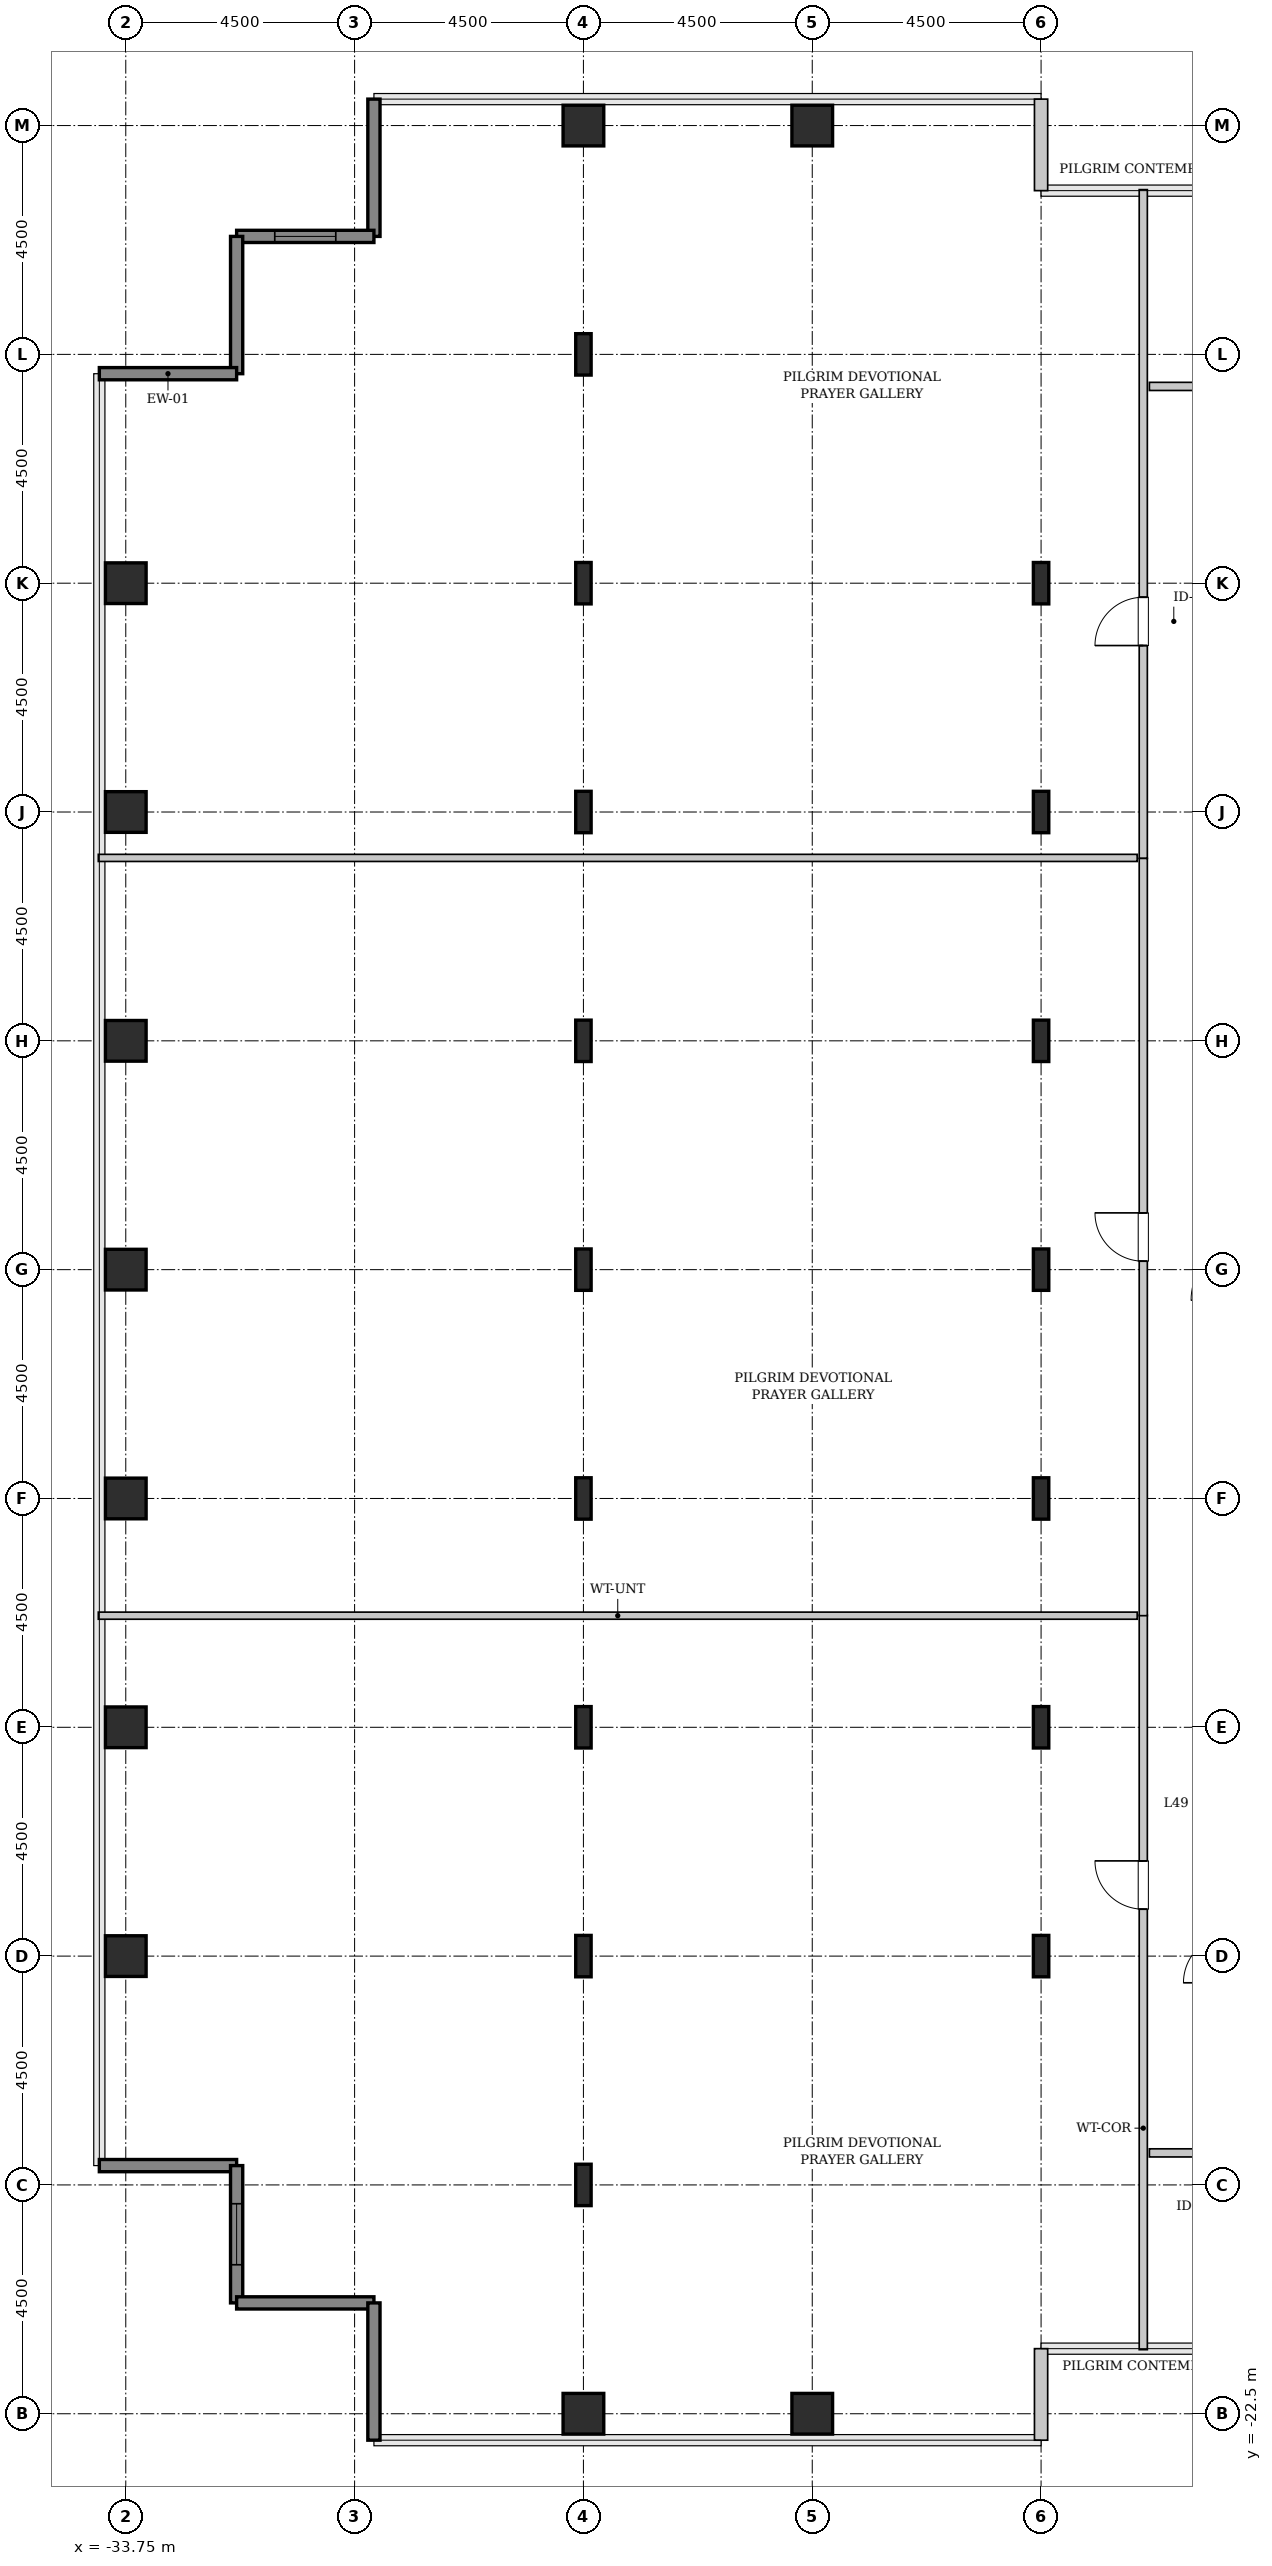
"""IFC4 building model, lengths in metres.
Left out: names, types, materials, properties, quantities, classifications, styles, units other than length and angle.
Written with IfcOpenShell. Run it as: python <this file> out.ifc"""

import sys

from ifc_helpers import new_model, si_unit, direction, frame, frame_2d, origin, origin_2d, place, context, subcontext, project, spatial, rectangle, hollow_rectangle, i_section, extrude, source, transform, mapped, element, fill, save


model = new_model("IFC4")
c1 = context("Model", 3, precision=1e-05, world=origin(), true_north=direction((0.0, 1.0)))
c2 = subcontext(c1, "Body", "Model", "MODEL_VIEW")
j1 = project(units=[si_unit("LENGTHUNIT", "METRE"), si_unit("PLANEANGLEUNIT", "RADIAN")], contexts=[c1])
p1 = place(None, origin())
s1 = spatial("IfcSite", under=j1, at=p1, CompositionType="ELEMENT")
p2 = place(p1, origin())
s2 = spatial("IfcBuilding", under=s1, at=p2, CompositionType="ELEMENT")
p3 = place(p2, frame((0.0, 0.0, 198.2)))
s3 = spatial("IfcBuildingStorey", under=s2, at=p3, CompositionType="ELEMENT", Elevation=198.2)
m1 = source(origin(), c2, "Body", "SweptSolid", [
    extrude(hollow_rectangle(XDim=0.8, YDim=0.8, WallThickness=0.04, InnerFilletRadius=0.04, OuterFilletRadius=0.08, at=origin_2d()), origin(), (0.0, 0.0, 1.0), 3.8),
])
for number, where, z_axis, x_axis in (
    (1, (-33.75, -13.5, 0.0), (0.0, 0.0, 1.0), (1.0, 0.0, 0.0)),
    (2, (-33.75, -9.0, 0.0), (0.0, 0.0, 1.0), (1.0, 0.0, 0.0)),
    (3, (-33.75, -4.5, 0.0), (0.0, 0.0, 1.0), (1.0, 0.0, 0.0)),
    (4, (-33.75, 0.0, 0.0), (0.0, 0.0, 1.0), (1.0, 0.0, 0.0)),
    (5, (-33.75, 4.5, 0.0), (0.0, 0.0, 1.0), (1.0, 0.0, 0.0)),
    (6, (-33.75, 9.0, 0.0), (0.0, 0.0, 1.0), (1.0, 0.0, 0.0)),
    (7, (-33.75, 13.5, 0.0), (0.0, 0.0, 1.0), (1.0, 0.0, 0.0)),
    (8, (-24.75, -22.5, 0.0), (0.0, 0.0, 1.0), (1.0, 0.0, 0.0)),
):
    element("IfcColumn", number, at=place(p3, frame(where, z_axis=z_axis, x_axis=x_axis)), inside=s3, PredefinedType="COLUMN", context=c2, shape_type="MappedRepresentation", body=[
        mapped(m1, transform((0.0, 0.0, 0.0), x_axis=(1.0, 0.0, 0.0), y_axis=(0.0, 1.0, 0.0), z_axis=(0.0, 0.0, 1.0), scale=1.0)),
    ])
m2 = source(origin(), c2, "Body", "SweptSolid", [
    extrude(i_section(OverallWidth=0.303, OverallDepth=0.814, WebThickness=0.021, FlangeThickness=0.04, FilletRadius=0.03, at=origin_2d()), origin(), (0.0, 0.0, 1.0), 3.8),
])
for number, where, z_axis, x_axis in (
    (9, (-24.75, -18.0, 0.0), (0.0, 0.0, 1.0), (1.0, 0.0, 0.0)),
    (10, (-24.75, -13.5, 0.0), (0.0, 0.0, 1.0), (1.0, 0.0, 0.0)),
    (11, (-24.75, -9.0, 0.0), (0.0, 0.0, 1.0), (1.0, 0.0, 0.0)),
    (12, (-24.75, -4.5, 0.0), (0.0, 0.0, 1.0), (1.0, 0.0, 0.0)),
    (13, (-24.75, 0.0, 0.0), (0.0, 0.0, 1.0), (1.0, 0.0, 0.0)),
    (14, (-24.75, 4.5, 0.0), (0.0, 0.0, 1.0), (1.0, 0.0, 0.0)),
    (15, (-24.75, 9.0, 0.0), (0.0, 0.0, 1.0), (1.0, 0.0, 0.0)),
    (16, (-24.75, 13.5, 0.0), (0.0, 0.0, 1.0), (1.0, 0.0, 0.0)),
    (17, (-24.75, 18.0, 0.0), (0.0, 0.0, 1.0), (1.0, 0.0, 0.0)),
):
    element("IfcColumn", number, at=place(p3, frame(where, z_axis=z_axis, x_axis=x_axis)), inside=s3, PredefinedType="COLUMN", context=c2, shape_type="MappedRepresentation", body=[
        mapped(m2, transform((0.0, 0.0, 0.0), x_axis=(1.0, 0.0, 0.0), y_axis=(0.0, 1.0, 0.0), z_axis=(0.0, 0.0, 1.0), scale=1.0)),
    ])
for number, where, z_axis, x_axis in (
    (18, (-24.75, 22.5, 0.0), (0.0, 0.0, 1.0), (1.0, 0.0, 0.0)),
    (19, (-20.25, -22.5, 0.0), (0.0, 0.0, 1.0), (1.0, 0.0, 0.0)),
    (20, (-20.25, 22.5, 0.0), (0.0, 0.0, 1.0), (1.0, 0.0, 0.0)),
):
    element("IfcColumn", number, at=place(p3, frame(where, z_axis=z_axis, x_axis=x_axis)), inside=s3, PredefinedType="COLUMN", context=c2, shape_type="MappedRepresentation", body=[
        mapped(m1, transform((0.0, 0.0, 0.0), x_axis=(1.0, 0.0, 0.0), y_axis=(0.0, 1.0, 0.0), z_axis=(0.0, 0.0, 1.0), scale=1.0)),
    ])
for number, where, z_axis, x_axis in (
    (21, (-15.75, -13.5, 0.0), (0.0, 0.0, 1.0), (1.0, 0.0, 0.0)),
    (22, (-15.75, -9.0, 0.0), (0.0, 0.0, 1.0), (1.0, 0.0, 0.0)),
    (23, (-15.75, -4.5, 0.0), (0.0, 0.0, 1.0), (1.0, 0.0, 0.0)),
    (24, (-15.75, 0.0, 0.0), (0.0, 0.0, 1.0), (1.0, 0.0, 0.0)),
    (25, (-15.75, 4.5, 0.0), (0.0, 0.0, 1.0), (1.0, 0.0, 0.0)),
    (26, (-15.75, 9.0, 0.0), (0.0, 0.0, 1.0), (1.0, 0.0, 0.0)),
    (27, (-15.75, 13.5, 0.0), (0.0, 0.0, 1.0), (1.0, 0.0, 0.0)),
):
    element("IfcColumn", number, at=place(p3, frame(where, z_axis=z_axis, x_axis=x_axis)), inside=s3, PredefinedType="COLUMN", context=c2, shape_type="MappedRepresentation", body=[
        mapped(m2, transform((0.0, 0.0, 0.0), x_axis=(1.0, 0.0, 0.0), y_axis=(0.0, 1.0, 0.0), z_axis=(0.0, 0.0, 1.0), scale=1.0)),
    ])
m3 = source(origin(), c2, "Body", "SweptSolid", [
    extrude(rectangle(XDim=1.8, YDim=0.26, at=frame_2d((0.9, 0.0))), origin(), (0.0, 0.0, 1.0), 3.5),
])
p4 = place(p3, frame((-15.75, 21.22, 0.0), z_axis=(0.0, 0.0, 1.0), x_axis=(0.0, 1.0, 0.0)))
e28 = element("IfcWall", 28, at=p4, inside=s3, PredefinedType="SOLIDWALL", context=c2, shape_type="MappedRepresentation", body=[
    mapped(m3, transform((0.0, 0.0, 0.0), x_axis=(1.0, 0.0, 0.0), y_axis=(0.0, 1.0, 0.0), z_axis=(0.0, 0.0, 1.0), scale=1.0)),
])
m4 = source(origin(), c2, "Body", "SweptSolid", [
    extrude(rectangle(XDim=2.7, YDim=0.24, at=frame_2d((1.35, 0.0))), origin(), (0.0, 0.0, 1.0), 3.5),
])
p5 = place(p3, frame((-28.87, 23.02, 0.0), z_axis=(0.0, 0.0, 1.0), x_axis=(0.0, -1.0, 0.0)))
e29 = element("IfcWall", 29, at=p5, inside=s3, PredefinedType="SHEAR", context=c2, shape_type="MappedRepresentation", body=[
    mapped(m4, transform((0.0, 0.0, 0.0), x_axis=(1.0, 0.0, 0.0), y_axis=(0.0, 1.0, 0.0), z_axis=(0.0, 0.0, 1.0), scale=1.0)),
])
p6 = place(p3, frame((-28.87, 20.32, 0.0), z_axis=(0.0, 0.0, 1.0), x_axis=(-1.0, 0.0, 0.0)))
e30 = element("IfcWall", 30, at=p6, inside=s3, PredefinedType="SHEAR", context=c2, shape_type="MappedRepresentation", body=[
    mapped(m4, transform((0.0, 0.0, 0.0), x_axis=(1.0, 0.0, 0.0), y_axis=(0.0, 1.0, 0.0), z_axis=(0.0, 0.0, 1.0), scale=1.0)),
])
p7 = place(p6, frame((0.75, 0.0, 0.85)))
e31 = element("IfcOpeningElement", 31, at=p7, cuts=e30, PredefinedType="OPENING", context=c2, shape_type="SweptSolid", body=[
    extrude(rectangle(XDim=1.2, YDim=1.8, at=frame_2d((0.6, 0.9))), frame((0.0, 0.13, 0.0), z_axis=(0.0, -1.0, 0.0), x_axis=(1.0, 0.0, 0.0)), (0.0, 0.0, 1.0), 0.26),
])
for number, where, z_axis, x_axis in (
    (32, (-31.57, 20.32, 0.0), (0.0, 0.0, 1.0), (0.0, -1.0, 0.0)),
    (33, (-31.57, 17.62, 0.0), (0.0, 0.0, 1.0), (-1.0, 0.0, 0.0)),
    (34, (-34.27, -17.62, 0.0), (0.0, 0.0, 1.0), (1.0, 0.0, 0.0)),
):
    element("IfcWall", number, at=place(p3, frame(where, z_axis=z_axis, x_axis=x_axis)), inside=s3, PredefinedType="SHEAR", context=c2, shape_type="MappedRepresentation", body=[
        mapped(m4, transform((0.0, 0.0, 0.0), x_axis=(1.0, 0.0, 0.0), y_axis=(0.0, 1.0, 0.0), z_axis=(0.0, 0.0, 1.0), scale=1.0)),
    ])
p8 = place(p3, frame((-31.57, -17.62, 0.0), z_axis=(0.0, 0.0, 1.0), x_axis=(0.0, -1.0, 0.0)))
e35 = element("IfcWall", 35, at=p8, inside=s3, PredefinedType="SHEAR", context=c2, shape_type="MappedRepresentation", body=[
    mapped(m4, transform((0.0, 0.0, 0.0), x_axis=(1.0, 0.0, 0.0), y_axis=(0.0, 1.0, 0.0), z_axis=(0.0, 0.0, 1.0), scale=1.0)),
])
p9 = place(p8, frame((0.75, 0.0, 0.85)))
e36 = element("IfcOpeningElement", 36, at=p9, cuts=e35, PredefinedType="OPENING", context=c2, shape_type="SweptSolid", body=[
    extrude(rectangle(XDim=1.2, YDim=1.8, at=frame_2d((0.6, 0.9))), frame((0.0, 0.13, 0.0), z_axis=(0.0, -1.0, 0.0), x_axis=(1.0, 0.0, 0.0)), (0.0, 0.0, 1.0), 0.26),
])
for number, where, z_axis, x_axis in (
    (37, (-31.57, -20.32, 0.0), (0.0, 0.0, 1.0), (1.0, 0.0, 0.0)),
    (38, (-28.87, -20.32, 0.0), (0.0, 0.0, 1.0), (0.0, -1.0, 0.0)),
):
    element("IfcWall", number, at=place(p3, frame(where, z_axis=z_axis, x_axis=x_axis)), inside=s3, PredefinedType="SHEAR", context=c2, shape_type="MappedRepresentation", body=[
        mapped(m4, transform((0.0, 0.0, 0.0), x_axis=(1.0, 0.0, 0.0), y_axis=(0.0, 1.0, 0.0), z_axis=(0.0, 0.0, 1.0), scale=1.0)),
    ])
p10 = place(p3, frame((-15.75, -23.02, 0.0), z_axis=(0.0, 0.0, 1.0), x_axis=(0.0, 1.0, 0.0)))
e39 = element("IfcWall", 39, at=p10, inside=s3, PredefinedType="SOLIDWALL", context=c2, shape_type="MappedRepresentation", body=[
    mapped(m3, transform((0.0, 0.0, 0.0), x_axis=(1.0, 0.0, 0.0), y_axis=(0.0, 1.0, 0.0), z_axis=(0.0, 0.0, 1.0), scale=1.0)),
])
m5 = source(origin(), c2, "Body", "SweptSolid", [
    extrude(rectangle(XDim=14.445, YDim=0.16, at=frame_2d((7.223, 0.0))), origin(), (0.0, 0.0, 1.0), 3.485),
])
p11 = place(p3, frame((-13.74, -21.24, 0.0), z_axis=(0.0, 0.0, 1.0), x_axis=(0.0, 1.0, 0.0)))
e40 = element("IfcWall", 40, at=p11, inside=s3, PredefinedType="PARTITIONING", context=c2, shape_type="MappedRepresentation", body=[
    mapped(m5, transform((0.0, 0.0, 0.0), x_axis=(1.0, 0.0, 0.0), y_axis=(0.0, 1.0, 0.0), z_axis=(0.0, 0.0, 1.0), scale=1.0)),
])
p12 = place(p11, frame((8.663, 0.0, 0.0)))
e41 = element("IfcOpeningElement", 41, at=p12, cuts=e40, PredefinedType="OPENING", context=c2, shape_type="SweptSolid", body=[
    extrude(rectangle(XDim=0.95, YDim=2.1, at=frame_2d((0.475, 1.05))), frame((0.0, 0.09, 0.0), z_axis=(0.0, -1.0, 0.0), x_axis=(1.0, 0.0, 0.0)), (0.0, 0.0, 1.0), 0.18),
])
m6 = source(origin(), c2, "Body", "SweptSolid", [
    extrude(rectangle(XDim=20.43, YDim=0.14, at=frame_2d((10.215, 0.0))), origin(), (0.0, 0.0, 1.0), 3.485),
])
p13 = place(p3, frame((-34.29, -6.805, 0.0), z_axis=(0.0, 0.0, 1.0), x_axis=(1.0, 0.0, 0.0)))
e42 = element("IfcWall", 42, at=p13, inside=s3, PredefinedType="PARTITIONING", context=c2, shape_type="MappedRepresentation", body=[
    mapped(m6, transform((0.0, 0.0, 0.0), x_axis=(1.0, 0.0, 0.0), y_axis=(0.0, 1.0, 0.0), z_axis=(0.0, 0.0, 1.0), scale=1.0)),
])
m7 = source(origin(), c2, "Body", "SweptSolid", [
    extrude(rectangle(XDim=13.153, YDim=0.16, at=frame_2d((6.576, 0.0))), origin(), (0.0, 0.0, 1.0), 3.485),
])
p14 = place(p3, frame((-13.74, 8.087, 0.0), z_axis=(0.0, 0.0, 1.0), x_axis=(0.0, 1.0, 0.0)))
e43 = element("IfcWall", 43, at=p14, inside=s3, PredefinedType="PARTITIONING", context=c2, shape_type="MappedRepresentation", body=[
    mapped(m7, transform((0.0, 0.0, 0.0), x_axis=(1.0, 0.0, 0.0), y_axis=(0.0, 1.0, 0.0), z_axis=(0.0, 0.0, 1.0), scale=1.0)),
])
p15 = place(p14, frame((4.186, 0.0, 0.0)))
e44 = element("IfcOpeningElement", 44, at=p15, cuts=e43, PredefinedType="OPENING", context=c2, shape_type="SweptSolid", body=[
    extrude(rectangle(XDim=0.95, YDim=2.1, at=frame_2d((0.475, 1.05))), frame((0.0, 0.09, 0.0), z_axis=(0.0, -1.0, 0.0), x_axis=(1.0, 0.0, 0.0)), (0.0, 0.0, 1.0), 0.18),
])
p16 = place(p3, frame((-34.29, 8.097, 0.0), z_axis=(0.0, 0.0, 1.0), x_axis=(1.0, 0.0, 0.0)))
e45 = element("IfcWall", 45, at=p16, inside=s3, PredefinedType="PARTITIONING", context=c2, shape_type="MappedRepresentation", body=[
    mapped(m6, transform((0.0, 0.0, 0.0), x_axis=(1.0, 0.0, 0.0), y_axis=(0.0, 1.0, 0.0), z_axis=(0.0, 0.0, 1.0), scale=1.0)),
])
m8 = source(origin(), c2, "Body", "SweptSolid", [
    extrude(rectangle(XDim=14.892, YDim=0.16, at=frame_2d((7.446, 0.0))), origin(), (0.0, 0.0, 1.0), 3.485),
])
p17 = place(p3, frame((-13.74, -6.805, 0.0), z_axis=(0.0, 0.0, 1.0), x_axis=(0.0, 1.0, 0.0)))
e46 = element("IfcWall", 46, at=p17, inside=s3, PredefinedType="PARTITIONING", context=c2, shape_type="MappedRepresentation", body=[
    mapped(m8, transform((0.0, 0.0, 0.0), x_axis=(1.0, 0.0, 0.0), y_axis=(0.0, 1.0, 0.0), z_axis=(0.0, 0.0, 1.0), scale=1.0)),
])
p18 = place(p17, frame((6.971, 0.0, 0.0)))
e47 = element("IfcOpeningElement", 47, at=p18, cuts=e46, PredefinedType="OPENING", context=c2, shape_type="SweptSolid", body=[
    extrude(rectangle(XDim=0.95, YDim=2.1, at=frame_2d((0.475, 1.05))), frame((0.0, 0.09, 0.0), z_axis=(0.0, -1.0, 0.0), x_axis=(1.0, 0.0, 0.0)), (0.0, 0.0, 1.0), 0.18),
])
m9 = source(origin(), c2, "Body", "SweptSolid", [
    extrude(rectangle(XDim=4.16, YDim=0.16, at=frame_2d((2.08, 0.0))), origin(), (0.0, 0.0, 1.0), 3.485),
])
p19 = place(p3, frame((-13.62, 17.37, 0.0), z_axis=(0.0, 0.0, 1.0), x_axis=(1.0, 0.0, 0.0)))
e48 = element("IfcWall", 48, at=p19, inside=s3, PredefinedType="PARTITIONING", context=c2, shape_type="MappedRepresentation", body=[
    mapped(m9, transform((0.0, 0.0, 0.0), x_axis=(1.0, 0.0, 0.0), y_axis=(0.0, 1.0, 0.0), z_axis=(0.0, 0.0, 1.0), scale=1.0)),
])
p20 = place(p19, frame((0.969, 0.0, 0.0)))
e49 = element("IfcOpeningElement", 49, at=p20, cuts=e48, PredefinedType="OPENING", context=c2, shape_type="SweptSolid", body=[
    extrude(rectangle(XDim=0.95, YDim=2.1, at=frame_2d((0.475, 1.05))), frame((0.0, 0.09, 0.0), z_axis=(0.0, -1.0, 0.0), x_axis=(1.0, 0.0, 0.0)), (0.0, 0.0, 1.0), 0.18),
])
m10 = source(origin(), c2, "Body", "SweptSolid", [
    extrude(rectangle(XDim=3.625, YDim=0.16, at=frame_2d((1.812, 0.0))), origin(), (0.0, 0.0, 1.0), 3.485),
])
p21 = place(p3, frame((-13.62, -17.37, 0.0), z_axis=(0.0, 0.0, 1.0), x_axis=(1.0, 0.0, 0.0)))
e50 = element("IfcWall", 50, at=p21, inside=s3, PredefinedType="PARTITIONING", context=c2, shape_type="MappedRepresentation", body=[
    mapped(m10, transform((0.0, 0.0, 0.0), x_axis=(1.0, 0.0, 0.0), y_axis=(0.0, 1.0, 0.0), z_axis=(0.0, 0.0, 1.0), scale=1.0)),
])
p22 = place(p21, frame((0.999, 0.0, 0.0)))
e51 = element("IfcOpeningElement", 51, at=p22, cuts=e50, PredefinedType="OPENING", context=c2, shape_type="SweptSolid", body=[
    extrude(rectangle(XDim=0.95, YDim=2.1, at=frame_2d((0.475, 1.05))), frame((0.0, 0.09, 0.0), z_axis=(0.0, -1.0, 0.0), x_axis=(1.0, 0.0, 0.0)), (0.0, 0.0, 1.0), 0.18),
])
m11 = source(origin(), c2, "Body", "SweptSolid", [
    extrude(rectangle(XDim=1.2, YDim=1.8, at=frame_2d((0.6, 0.9))), frame((0.0, 0.03, 0.0), z_axis=(0.0, -1.0, 0.0), x_axis=(1.0, 0.0, 0.0)), (0.0, 0.0, 1.0), 0.06),
])
p23 = place(p7, origin())
e52 = element("IfcWindow", 52, at=p23, inside=s3, PartitioningType="SINGLE_PANEL", PredefinedType="WINDOW", context=c2, shape_type="MappedRepresentation", body=[
    mapped(m11, transform((0.0, 0.0, 0.0), x_axis=(1.0, 0.0, 0.0), y_axis=(0.0, 1.0, 0.0), z_axis=(0.0, 0.0, 1.0), scale=1.0)),
])
fill(e31, e52)
p24 = place(p9, origin())
e53 = element("IfcWindow", 53, at=p24, inside=s3, PartitioningType="SINGLE_PANEL", PredefinedType="WINDOW", context=c2, shape_type="MappedRepresentation", body=[
    mapped(m11, transform((0.0, 0.0, 0.0), x_axis=(1.0, 0.0, 0.0), y_axis=(0.0, 1.0, 0.0), z_axis=(0.0, 0.0, 1.0), scale=1.0)),
])
fill(e36, e53)
m12 = source(origin(), c2, "Body", "SweptSolid", [
    extrude(rectangle(XDim=0.95, YDim=2.1, at=frame_2d((0.475, 1.05))), frame((0.0, 0.025, 0.0), z_axis=(0.0, -1.0, 0.0), x_axis=(1.0, 0.0, 0.0)), (0.0, 0.0, 1.0), 0.05),
])
p25 = place(p12, origin())
e54 = element("IfcDoor", 54, at=p25, inside=s3, OperationType="SINGLE_SWING_RIGHT", PredefinedType="DOOR", context=c2, shape_type="MappedRepresentation", body=[
    mapped(m12, transform((0.0, 0.0, 0.0), x_axis=(1.0, 0.0, 0.0), y_axis=(0.0, 1.0, 0.0), z_axis=(0.0, 0.0, 1.0), scale=1.0)),
])
fill(e41, e54)
p26 = place(p15, origin())
e55 = element("IfcDoor", 55, at=p26, inside=s3, OperationType="SINGLE_SWING_LEFT", PredefinedType="DOOR", context=c2, shape_type="MappedRepresentation", body=[
    mapped(m12, transform((0.0, 0.0, 0.0), x_axis=(1.0, 0.0, 0.0), y_axis=(0.0, 1.0, 0.0), z_axis=(0.0, 0.0, 1.0), scale=1.0)),
])
fill(e44, e55)
p27 = place(p18, origin())
e56 = element("IfcDoor", 56, at=p27, inside=s3, OperationType="SINGLE_SWING_RIGHT", PredefinedType="DOOR", context=c2, shape_type="MappedRepresentation", body=[
    mapped(m12, transform((0.0, 0.0, 0.0), x_axis=(1.0, 0.0, 0.0), y_axis=(0.0, 1.0, 0.0), z_axis=(0.0, 0.0, 1.0), scale=1.0)),
])
fill(e47, e56)
save(model, sys.argv[1])
